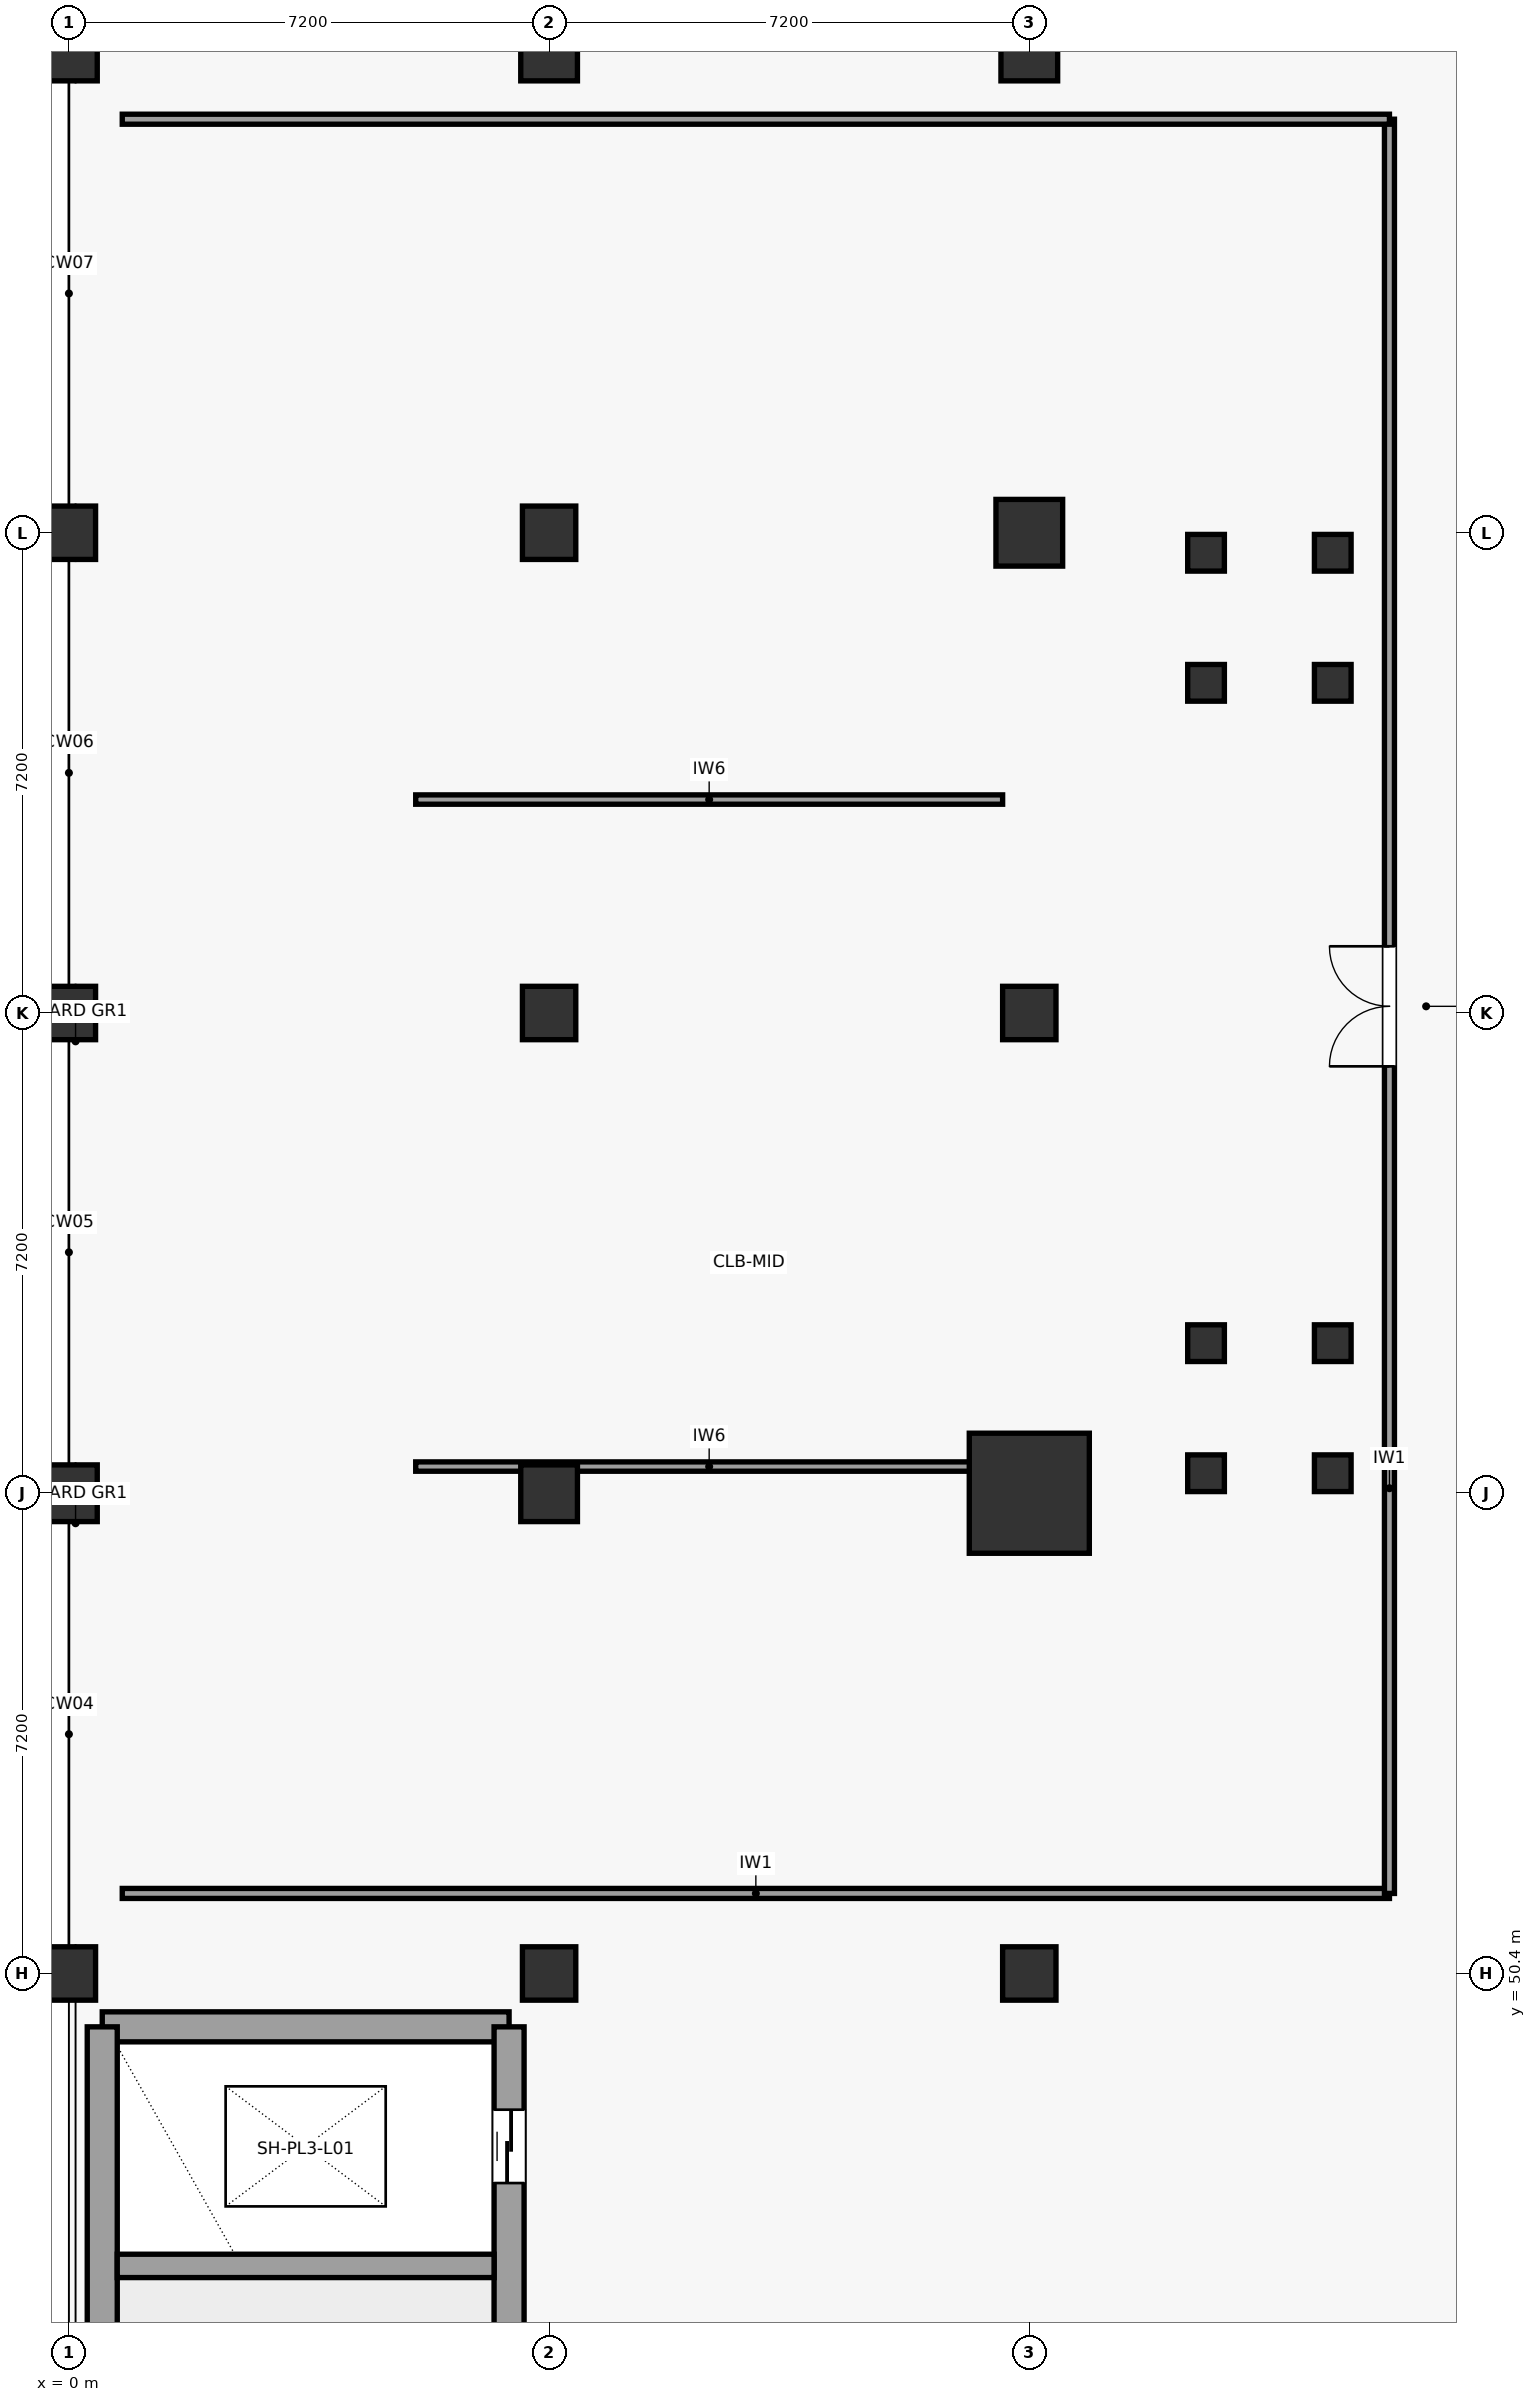
"""IFC4 building model, lengths in metres.
Left out: names, types, materials, properties, quantities, classifications, styles, units other than length and angle.
Written with IfcOpenShell. Run it as: python <this file> out.ifc"""

import sys

from ifc_helpers import new_model, si_unit, direction, frame, frame_2d, origin, origin_2d, place, context, subcontext, project, spatial, rectangle, circle, extrude, element, fill, save


model = new_model("IFC4")
c1 = context("Model", 3, precision=1e-05, world=origin(), true_north=direction((0.0, 1.0)))
c2 = subcontext(c1, "Body", "Model", "MODEL_VIEW")
j1 = project(units=[si_unit("LENGTHUNIT", "METRE"), si_unit("PLANEANGLEUNIT", "RADIAN")], contexts=[c1])
p1 = place(None, origin())
s1 = spatial("IfcSite", under=j1, at=p1, CompositionType="ELEMENT")
p2 = place(p1, origin())
s2 = spatial("IfcBuilding", under=s1, at=p2, CompositionType="ELEMENT")
p3 = place(p2, frame((0.0, 0.0, 5.4)))
s3 = spatial("IfcBuildingStorey", under=s2, at=p3, CompositionType="ELEMENT", Elevation=5.4)
p4 = place(p3, frame((0.0, 50.4, 0.0), z_axis=(0.0, 0.0, 1.0), x_axis=(1.0, 0.0, 0.0)))
e1 = element("IfcColumn", 1, at=p4, inside=s3, PredefinedType="COLUMN", context=c2, shape_type="SweptSolid", body=[
    extrude(circle(Radius=0.4, at=origin_2d()), origin(), (0.0, 0.0, 1.0), 4.2),
])
p5 = place(p3, frame((0.0, 57.6, 0.0), z_axis=(0.0, 0.0, 1.0), x_axis=(1.0, 0.0, 0.0)))
e2 = element("IfcColumn", 2, at=p5, inside=s3, PredefinedType="COLUMN", context=c2, shape_type="SweptSolid", body=[
    extrude(rectangle(XDim=0.85, YDim=0.85, at=origin_2d()), origin(), (0.0, 0.0, 1.0), 4.2),
])
p6 = place(p3, frame((0.0, 64.8, 0.0), z_axis=(0.0, 0.0, 1.0), x_axis=(1.0, 0.0, 0.0)))
e3 = element("IfcColumn", 3, at=p6, inside=s3, PredefinedType="COLUMN", context=c2, shape_type="SweptSolid", body=[
    extrude(rectangle(XDim=0.8, YDim=0.8, at=origin_2d()), origin(), (0.0, 0.0, 1.0), 4.2),
])
p7 = place(p3, frame((0.0, 72.0, 0.0), z_axis=(0.0, 0.0, 1.0), x_axis=(1.0, 0.0, 0.0)))
e4 = element("IfcColumn", 4, at=p7, inside=s3, PredefinedType="COLUMN", context=c2, shape_type="SweptSolid", body=[
    extrude(circle(Radius=0.4, at=origin_2d()), origin(), (0.0, 0.0, 1.0), 4.2),
])
p8 = place(p3, frame((0.0, 79.2, 0.0), z_axis=(0.0, 0.0, 1.0), x_axis=(1.0, 0.0, 0.0)))
e5 = element("IfcColumn", 5, at=p8, inside=s3, PredefinedType="COLUMN", context=c2, shape_type="SweptSolid", body=[
    extrude(rectangle(XDim=0.85, YDim=0.85, at=origin_2d()), origin(), (0.0, 0.0, 1.0), 4.2),
])
p9 = place(p3, frame((7.2, 50.4, 0.0), z_axis=(0.0, 0.0, 1.0), x_axis=(1.0, 0.0, 0.0)))
e6 = element("IfcColumn", 6, at=p9, inside=s3, PredefinedType="COLUMN", context=c2, shape_type="SweptSolid", body=[
    extrude(circle(Radius=0.4, at=origin_2d()), origin(), (0.0, 0.0, 1.0), 4.2),
])
p10 = place(p3, frame((7.2, 57.6, 0.0), z_axis=(0.0, 0.0, 1.0), x_axis=(1.0, 0.0, 0.0)))
e7 = element("IfcColumn", 7, at=p10, inside=s3, PredefinedType="COLUMN", context=c2, shape_type="SweptSolid", body=[
    extrude(rectangle(XDim=0.85, YDim=0.85, at=origin_2d()), origin(), (0.0, 0.0, 1.0), 4.2),
])
p11 = place(p3, frame((7.2, 64.8, 0.0), z_axis=(0.0, 0.0, 1.0), x_axis=(1.0, 0.0, 0.0)))
e8 = element("IfcColumn", 8, at=p11, inside=s3, PredefinedType="COLUMN", context=c2, shape_type="SweptSolid", body=[
    extrude(rectangle(XDim=0.8, YDim=0.8, at=origin_2d()), origin(), (0.0, 0.0, 1.0), 4.2),
])
p12 = place(p3, frame((7.2, 72.0, 0.0), z_axis=(0.0, 0.0, 1.0), x_axis=(1.0, 0.0, 0.0)))
e9 = element("IfcColumn", 9, at=p12, inside=s3, PredefinedType="COLUMN", context=c2, shape_type="SweptSolid", body=[
    extrude(circle(Radius=0.4, at=origin_2d()), origin(), (0.0, 0.0, 1.0), 4.2),
])
p13 = place(p3, frame((7.2, 79.2, 0.0), z_axis=(0.0, 0.0, 1.0), x_axis=(1.0, 0.0, 0.0)))
e10 = element("IfcColumn", 10, at=p13, inside=s3, PredefinedType="COLUMN", context=c2, shape_type="SweptSolid", body=[
    extrude(rectangle(XDim=0.85, YDim=0.85, at=origin_2d()), origin(), (0.0, 0.0, 1.0), 4.2),
])
p14 = place(p3, frame((14.4, 50.4, 0.0), z_axis=(0.0, 0.0, 1.0), x_axis=(1.0, 0.0, 0.0)))
e11 = element("IfcColumn", 11, at=p14, inside=s3, PredefinedType="COLUMN", context=c2, shape_type="SweptSolid", body=[
    extrude(circle(Radius=0.4, at=origin_2d()), origin(), (0.0, 0.0, 1.0), 4.2),
])
p15 = place(p3, frame((14.4, 57.6, 0.0), z_axis=(0.0, 0.0, 1.0), x_axis=(1.0, 0.0, 0.0)))
e12 = element("IfcColumn", 12, at=p15, inside=s3, PredefinedType="COLUMN", context=c2, shape_type="SweptSolid", body=[
    extrude(circle(Radius=0.9, at=origin_2d()), origin(), (0.0, 0.0, 1.0), 4.2),
])
p16 = place(p3, frame((14.4, 64.8, 0.0), z_axis=(0.0, 0.0, 1.0), x_axis=(1.0, 0.0, 0.0)))
e13 = element("IfcColumn", 13, at=p16, inside=s3, PredefinedType="COLUMN", context=c2, shape_type="SweptSolid", body=[
    extrude(rectangle(XDim=0.8, YDim=0.8, at=origin_2d()), origin(), (0.0, 0.0, 1.0), 4.2),
])
p17 = place(p3, frame((14.4, 72.0, 0.0), z_axis=(0.0, 0.0, 1.0), x_axis=(1.0, 0.0, 0.0)))
e14 = element("IfcColumn", 14, at=p17, inside=s3, PredefinedType="COLUMN", context=c2, shape_type="SweptSolid", body=[
    extrude(circle(Radius=0.5, at=origin_2d()), origin(), (0.0, 0.0, 1.0), 4.2),
])
p18 = place(p3, frame((14.4, 79.2, 0.0), z_axis=(0.0, 0.0, 1.0), x_axis=(1.0, 0.0, 0.0)))
e15 = element("IfcColumn", 15, at=p18, inside=s3, PredefinedType="COLUMN", context=c2, shape_type="SweptSolid", body=[
    extrude(rectangle(XDim=0.85, YDim=0.85, at=origin_2d()), origin(), (0.0, 0.0, 1.0), 4.2),
])
p19 = place(p3, frame((0.5, 49.6, 0.0), z_axis=(0.0, 0.0, 1.0), x_axis=(1.0, 0.0, 0.0)))
e16 = element("IfcWall", 16, at=p19, inside=s3, PredefinedType="SHEAR", context=c2, shape_type="SweptSolid", body=[
    extrude(rectangle(XDim=6.1, YDim=0.45, at=frame_2d((3.05, 0.0))), origin(), (0.0, 0.0, 1.0), 3.92),
])
p20 = place(p3, frame((0.5, 36.8, 0.0), z_axis=(0.0, 0.0, 1.0), x_axis=(0.0, 1.0, 0.0)))
e17 = element("IfcWall", 17, at=p20, inside=s3, PredefinedType="SHEAR", context=c2, shape_type="SweptSolid", body=[
    extrude(rectangle(XDim=12.8, YDim=0.45, at=frame_2d((6.4, 0.0))), origin(), (0.0, 0.0, 1.0), 3.92),
])
p21 = place(p3, frame((6.6, 36.8, 0.0), z_axis=(0.0, 0.0, 1.0), x_axis=(0.0, 1.0, 0.0)))
e18 = element("IfcWall", 18, at=p21, inside=s3, PredefinedType="SHEAR", context=c2, shape_type="SweptSolid", body=[
    extrude(rectangle(XDim=12.8, YDim=0.45, at=frame_2d((6.4, 0.0))), origin(), (0.0, 0.0, 1.0), 3.92),
])
p22 = place(p21, frame((0.55, 0.0, 0.0)))
e19 = element("IfcOpeningElement", 19, at=p22, cuts=e18, PredefinedType="OPENING", context=c2, shape_type="SweptSolid", body=[
    extrude(rectangle(XDim=1.2, YDim=2.25, at=frame_2d((0.6, 1.125))), frame((0.0, 0.235, 0.0), z_axis=(0.0, -1.0, 0.0), x_axis=(1.0, 0.0, 0.0)), (0.0, 0.0, 1.0), 0.47),
])
p23 = place(p21, frame((10.458, 0.0, 0.0)))
e20 = element("IfcOpeningElement", 20, at=p23, cuts=e18, PredefinedType="OPENING", context=c2, shape_type="SweptSolid", body=[
    extrude(rectangle(XDim=1.1, YDim=2.2, at=frame_2d((0.55, 1.1))), frame((0.0, 0.235, 0.0), z_axis=(0.0, -1.0, 0.0), x_axis=(1.0, 0.0, 0.0)), (0.0, 0.0, 1.0), 0.47),
])
p24 = place(p3, frame((0.725, 46.016, 0.0), z_axis=(0.0, 0.0, 1.0), x_axis=(1.0, 0.0, 0.0)))
e21 = element("IfcWall", 21, at=p24, inside=s3, PredefinedType="SHEAR", context=c2, shape_type="SweptSolid", body=[
    extrude(rectangle(XDim=5.65, YDim=0.35, at=frame_2d((2.825, 0.0))), origin(), (0.0, 0.0, 1.0), 3.92),
])
for number, where, z_axis, x_axis in (
    (22, (17.05, 57.9, 0.0), (0.0, 0.0, 1.0), (1.0, 0.0, 0.0)),
    (23, (18.95, 57.9, 0.0), (0.0, 0.0, 1.0), (1.0, 0.0, 0.0)),
    (24, (17.05, 59.85, 0.0), (0.0, 0.0, 1.0), (1.0, 0.0, 0.0)),
    (25, (18.95, 59.85, 0.0), (0.0, 0.0, 1.0), (1.0, 0.0, 0.0)),
    (26, (17.05, 69.75, 0.0), (0.0, 0.0, 1.0), (1.0, 0.0, 0.0)),
    (27, (18.95, 69.75, 0.0), (0.0, 0.0, 1.0), (1.0, 0.0, 0.0)),
    (28, (17.05, 71.7, 0.0), (0.0, 0.0, 1.0), (1.0, 0.0, 0.0)),
    (29, (18.95, 71.7, 0.0), (0.0, 0.0, 1.0), (1.0, 0.0, 0.0)),
):
    element("IfcColumn", number, at=place(p3, frame(where, z_axis=z_axis, x_axis=x_axis)), inside=s3, PredefinedType="COLUMN", context=c2, shape_type="SweptSolid", body=[
        extrude(rectangle(XDim=0.55, YDim=0.55, at=origin_2d()), origin(), (0.0, 0.0, 1.0), 4.2),
    ])
p25 = place(p3, frame((0.8, 51.6, 0.0), z_axis=(0.0, 0.0, 1.0), x_axis=(1.0, 0.0, 0.0)))
e30 = element("IfcWall", 30, at=p25, inside=s3, PredefinedType="PARTITIONING", context=c2, shape_type="SweptSolid", body=[
    extrude(rectangle(XDim=19.0, YDim=0.15, at=frame_2d((9.5, 0.0))), origin(), (0.0, 0.0, 1.0), 2.98),
])
p26 = place(p3, frame((19.8, 51.6, 0.0), z_axis=(0.0, 0.0, 1.0), x_axis=(0.0, 1.0, 0.0)))
e31 = element("IfcWall", 31, at=p26, inside=s3, PredefinedType="PARTITIONING", context=c2, shape_type="SweptSolid", body=[
    extrude(rectangle(XDim=26.6, YDim=0.15, at=frame_2d((13.3, 0.0))), origin(), (0.0, 0.0, 1.0), 2.98),
])
p27 = place(p26, frame((12.4, 0.0, 0.0)))
e32 = element("IfcOpeningElement", 32, at=p27, cuts=e31, PredefinedType="OPENING", context=c2, shape_type="SweptSolid", body=[
    extrude(rectangle(XDim=1.8, YDim=2.3, at=frame_2d((0.9, 1.15))), frame((0.0, 0.085, 0.0), z_axis=(0.0, -1.0, 0.0), x_axis=(1.0, 0.0, 0.0)), (0.0, 0.0, 1.0), 0.17),
])
p28 = place(p3, frame((19.8, 78.2, 0.0), z_axis=(0.0, 0.0, 1.0), x_axis=(-1.0, 0.0, 0.0)))
e33 = element("IfcWall", 33, at=p28, inside=s3, PredefinedType="PARTITIONING", context=c2, shape_type="SweptSolid", body=[
    extrude(rectangle(XDim=19.0, YDim=0.15, at=frame_2d((9.5, 0.0))), origin(), (0.0, 0.0, 1.0), 2.98),
])
for number, where, z_axis, x_axis in (
    (34, (5.2, 58.0, 0.0), (0.0, 0.0, 1.0), (1.0, 0.0, 0.0)),
    (35, (5.2, 68.0, 0.0), (0.0, 0.0, 1.0), (1.0, 0.0, 0.0)),
):
    element("IfcWall", number, at=place(p3, frame(where, z_axis=z_axis, x_axis=x_axis)), inside=s3, PredefinedType="MOVABLE", context=c2, shape_type="SweptSolid", body=[
        extrude(rectangle(XDim=8.8, YDim=0.14, at=frame_2d((4.4, 0.0))), origin(), (0.0, 0.0, 1.0), 2.97),
    ])
p29 = place(p23, origin())
e36 = element("IfcDoor", 36, at=p29, inside=s3, OperationType="SLIDING_TO_LEFT", PredefinedType="DOOR", context=c2, shape_type="SweptSolid", body=[
    extrude(rectangle(XDim=1.1, YDim=2.2, at=frame_2d((0.55, 1.1))), frame((0.0, 0.025, 0.0), z_axis=(0.0, -1.0, 0.0), x_axis=(1.0, 0.0, 0.0)), (0.0, 0.0, 1.0), 0.05),
])
fill(e20, e36)
p30 = place(p27, origin())
e37 = element("IfcDoor", 37, at=p30, inside=s3, OperationType="DOUBLE_DOOR_SINGLE_SWING", PredefinedType="DOOR", context=c2, shape_type="SweptSolid", body=[
    extrude(rectangle(XDim=1.8, YDim=2.3, at=frame_2d((0.9, 1.15))), frame((0.0, 0.025, 0.0), z_axis=(0.0, -1.0, 0.0), x_axis=(1.0, 0.0, 0.0)), (0.0, 0.0, 1.0), 0.05),
])
fill(e32, e37)
save(model, sys.argv[1])
